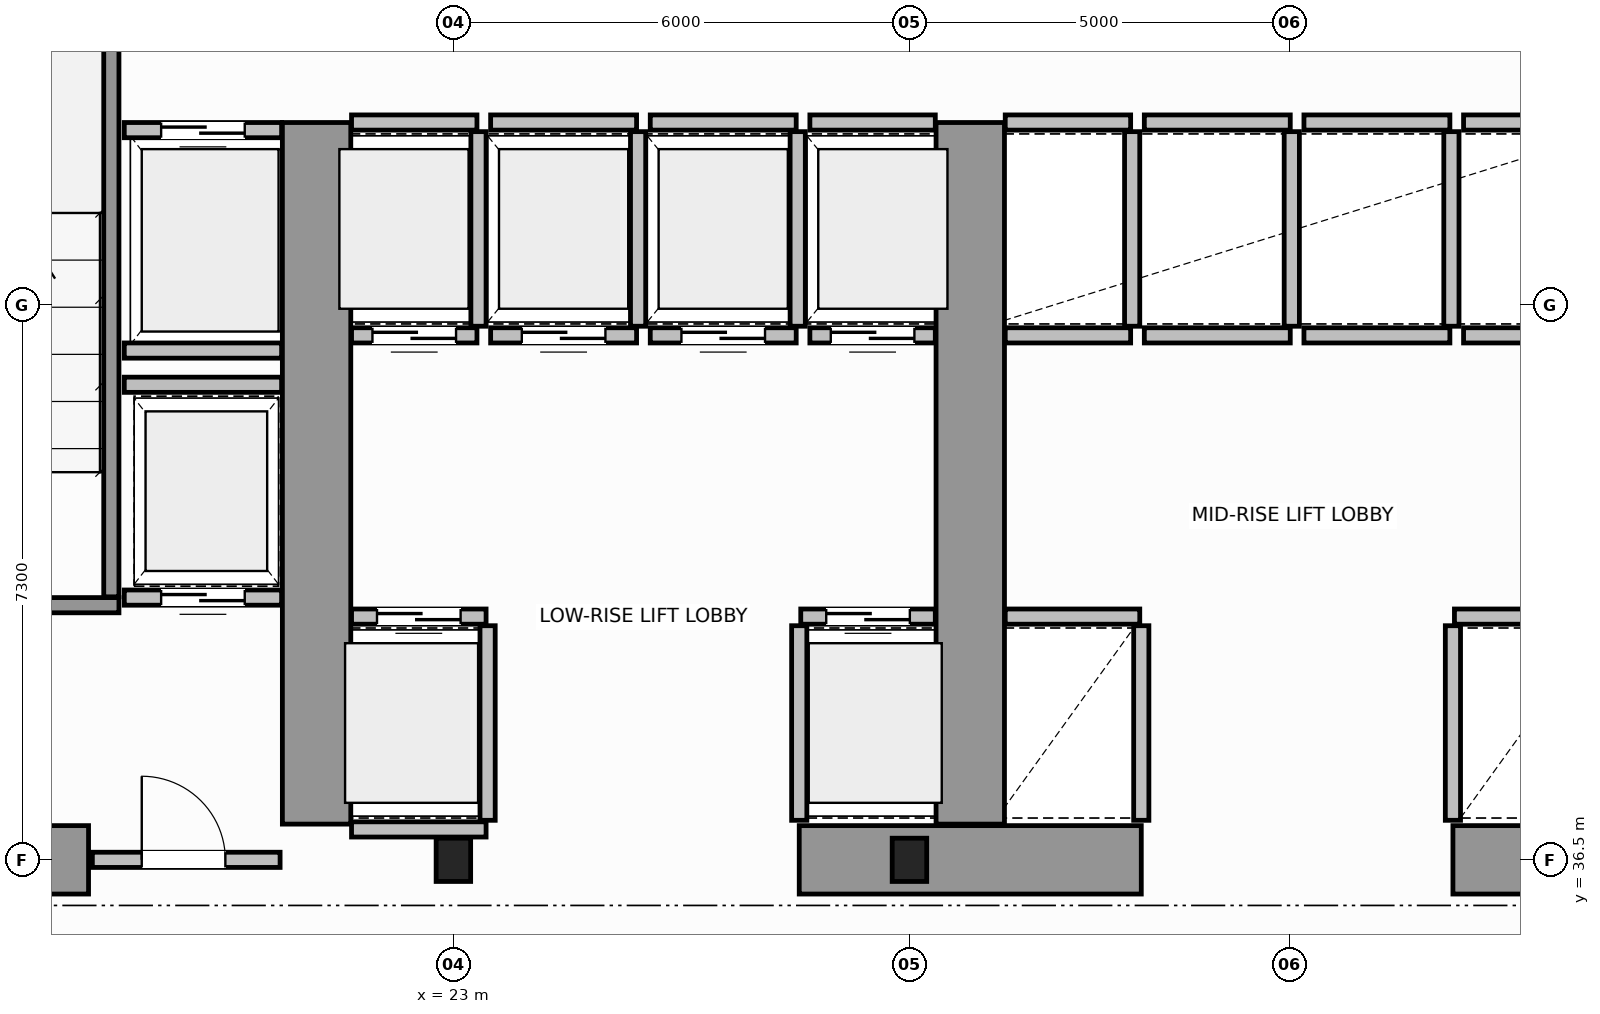
"""IFC4 building model, lengths in metres.
Left out: names, types, materials, properties, quantities, classifications, styles, units other than length and angle.
Written with IfcOpenShell. Run it as: python <this file> out.ifc"""

import sys

from ifc_helpers import new_model, si_unit, direction, frame, frame_2d, origin, origin_2d, place, context, subcontext, project, spatial, rectangle, i_section, extrude, source, transform, mapped, element, fill, save


model = new_model("IFC4")
c1 = context("Model", 3, precision=1e-05, world=origin(), true_north=direction((0.0, 1.0)))
c2 = subcontext(c1, "Body", "Model", "MODEL_VIEW")
j1 = project(units=[si_unit("LENGTHUNIT", "METRE"), si_unit("PLANEANGLEUNIT", "RADIAN")], contexts=[c1])
p1 = place(None, origin())
s1 = spatial("IfcSite", under=j1, at=p1, CompositionType="ELEMENT")
p2 = place(p1, origin())
s2 = spatial("IfcBuilding", under=s1, at=p2, CompositionType="ELEMENT")
p3 = place(p2, frame((0.0, 0.0, 68.2)))
s3 = spatial("IfcBuildingStorey", under=s2, at=p3, CompositionType="ELEMENT", Elevation=68.2)
m1 = source(origin(), c2, "Body", "SweptSolid", [
    extrude(i_section(OverallWidth=0.454, OverallDepth=0.569, WebThickness=0.078, FlangeThickness=0.08, FilletRadius=0.015, at=origin_2d()), origin(), (0.0, 0.0, 1.0), 3.8),
])
for number, where, z_axis, x_axis in (
    (1, (23.0, 36.5, 0.0), (0.0, 0.0, 1.0), (1.0, 0.0, 0.0)),
    (2, (29.0, 36.5, 0.0), (0.0, 0.0, 1.0), (1.0, 0.0, 0.0)),
):
    element("IfcColumn", number, at=place(p3, frame(where, z_axis=z_axis, x_axis=x_axis)), inside=s3, PredefinedType="COLUMN", context=c2, shape_type="MappedRepresentation", body=[
        mapped(m1, transform((0.0, 0.0, 0.0), scale=1.0)),
    ])
p4 = place(p3, frame((14.47, 36.5, 0.0), z_axis=(0.0, 0.0, 1.0), x_axis=(1.0, 0.0, 0.0)))
e3 = element("IfcWall", 3, at=p4, inside=s3, PredefinedType="SHEAR", context=c2, shape_type="SweptSolid", body=[
    extrude(rectangle(XDim=3.73, YDim=0.9, at=frame_2d((1.865, 0.0))), origin(), (0.0, 0.0, 1.0), 2.38),
])
for number, where, z_axis, x_axis in (
    (4, (27.55, 36.5, 0.0), (0.0, 0.0, 1.0), (1.0, 0.0, 0.0)),
    (5, (36.15, 36.5, 0.0), (0.0, 0.0, 1.0), (1.0, 0.0, 0.0)),
):
    element("IfcWall", number, at=place(p3, frame(where, z_axis=z_axis, x_axis=x_axis)), inside=s3, PredefinedType="SHEAR", context=c2, shape_type="SweptSolid", body=[
        extrude(rectangle(XDim=4.5, YDim=0.9, at=frame_2d((2.25, 0.0))), origin(), (0.0, 0.0, 1.0), 3.8),
    ])
for number, where, z_axis, x_axis in (
    (6, (21.2, 36.97, 0.0), (0.0, 0.0, 1.0), (0.0, 1.0, 0.0)),
    (7, (29.8, 36.97, 0.0), (0.0, 0.0, 1.0), (0.0, 1.0, 0.0)),
):
    element("IfcWall", number, at=place(p3, frame(where, z_axis=z_axis, x_axis=x_axis)), inside=s3, PredefinedType="SHEAR", context=c2, shape_type="SweptSolid", body=[
        extrude(rectangle(XDim=9.23, YDim=0.9, at=frame_2d((4.615, 0.0))), origin(), (0.0, 0.0, 1.0), 3.8),
    ])
p5 = place(p3, frame((14.45, 39.85, 0.0), z_axis=(0.0, 0.0, 1.0), x_axis=(1.0, 0.0, 0.0)))
e8 = element("IfcWall", 8, at=p5, inside=s3, PredefinedType="SOLIDWALL", context=c2, shape_type="SweptSolid", body=[
    extrude(rectangle(XDim=4.15, YDim=0.2, at=frame_2d((2.075, 0.0))), origin(), (0.0, 0.0, 1.0), 3.8),
])
p6 = place(p5, frame((1.725, 0.0, 0.0)))
e9 = element("IfcOpeningElement", 9, at=p6, cuts=e8, PredefinedType="OPENING", context=c2, shape_type="SweptSolid", body=[
    extrude(rectangle(XDim=1.1, YDim=2.15, at=frame_2d((0.55, 1.075))), frame((0.0, 0.11, 0.0), z_axis=(0.0, -1.0, 0.0), x_axis=(1.0, 0.0, 0.0)), (0.0, 0.0, 1.0), 0.22),
])
p7 = place(p3, frame((18.5, 39.96, 0.0), z_axis=(0.0, 0.0, 1.0), x_axis=(0.0, 1.0, 0.0)))
e10 = element("IfcWall", 10, at=p7, inside=s3, PredefinedType="SOLIDWALL", context=c2, shape_type="SweptSolid", body=[
    extrude(rectangle(XDim=9.93, YDim=0.2, at=frame_2d((4.965, 0.0))), origin(), (0.0, 0.0, 1.0), 3.8),
])
p8 = place(p3, frame((18.25, 36.5, 0.0), z_axis=(0.0, 0.0, 1.0), x_axis=(1.0, 0.0, 0.0)))
e11 = element("IfcWall", 11, at=p8, inside=s3, PredefinedType="SOLIDWALL", context=c2, shape_type="SweptSolid", body=[
    extrude(rectangle(XDim=2.47, YDim=0.2, at=frame_2d((1.235, 0.0))), origin(), (0.0, 0.0, 1.0), 2.37),
])
p9 = place(p8, frame((0.65, 0.0, 0.0)))
e12 = element("IfcOpeningElement", 12, at=p9, cuts=e11, PredefinedType="OPENING", context=c2, shape_type="SweptSolid", body=[
    extrude(rectangle(XDim=1.1, YDim=2.15, at=frame_2d((0.55, 1.075))), frame((0.0, 0.11, 0.0), z_axis=(0.0, -1.0, 0.0), x_axis=(1.0, 0.0, 0.0)), (0.0, 0.0, 1.0), 0.22),
])
p10 = place(p3, frame((21.66, 39.7, 0.0), z_axis=(0.0, 0.0, 1.0), x_axis=(1.0, 0.0, 0.0)))
e13 = element("IfcWall", 13, at=p10, inside=s3, PredefinedType="SOLIDWALL", context=c2, shape_type="SweptSolid", body=[
    extrude(rectangle(XDim=1.77, YDim=0.2, at=frame_2d((0.885, 0.0))), origin(), (0.0, 0.0, 1.0), 3.58),
])
p11 = place(p10, frame((0.335, 0.0, 0.0)))
e14 = element("IfcOpeningElement", 14, at=p11, cuts=e13, PredefinedType="OPENING", context=c2, shape_type="SweptSolid", body=[
    extrude(rectangle(XDim=1.1, YDim=2.15, at=frame_2d((0.55, 1.075))), frame((0.0, 0.11, 0.0), z_axis=(0.0, -1.0, 0.0), x_axis=(1.0, 0.0, 0.0)), (0.0, 0.0, 1.0), 0.22),
])
p12 = place(p3, frame((21.66, 36.9, 0.0), z_axis=(0.0, 0.0, 1.0), x_axis=(1.0, 0.0, 0.0)))
e15 = element("IfcWall", 15, at=p12, inside=s3, PredefinedType="SOLIDWALL", context=c2, shape_type="SweptSolid", body=[
    extrude(rectangle(XDim=1.77, YDim=0.2, at=frame_2d((0.885, 0.0))), origin(), (0.0, 0.0, 1.0), 2.37),
])
p13 = place(p3, frame((23.45, 37.02, 0.0), z_axis=(0.0, 0.0, 1.0), x_axis=(0.0, 1.0, 0.0)))
e16 = element("IfcWall", 16, at=p13, inside=s3, PredefinedType="SOLIDWALL", context=c2, shape_type="SweptSolid", body=[
    extrude(rectangle(XDim=2.56, YDim=0.2, at=frame_2d((1.28, 0.0))), origin(), (0.0, 0.0, 1.0), 3.58),
])
p14 = place(p3, frame((27.57, 39.7, 0.0), z_axis=(0.0, 0.0, 1.0), x_axis=(1.0, 0.0, 0.0)))
e17 = element("IfcWall", 17, at=p14, inside=s3, PredefinedType="SOLIDWALL", context=c2, shape_type="SweptSolid", body=[
    extrude(rectangle(XDim=1.77, YDim=0.2, at=frame_2d((0.885, 0.0))), origin(), (0.0, 0.0, 1.0), 3.58),
])
p15 = place(p14, frame((0.335, 0.0, 0.0)))
e18 = element("IfcOpeningElement", 18, at=p15, cuts=e17, PredefinedType="OPENING", context=c2, shape_type="SweptSolid", body=[
    extrude(rectangle(XDim=1.1, YDim=2.15, at=frame_2d((0.55, 1.075))), frame((0.0, 0.11, 0.0), z_axis=(0.0, -1.0, 0.0), x_axis=(1.0, 0.0, 0.0)), (0.0, 0.0, 1.0), 0.22),
])
p16 = place(p3, frame((27.55, 37.02, 0.0), z_axis=(0.0, 0.0, 1.0), x_axis=(0.0, 1.0, 0.0)))
e19 = element("IfcWall", 19, at=p16, inside=s3, PredefinedType="SOLIDWALL", context=c2, shape_type="SweptSolid", body=[
    extrude(rectangle(XDim=2.56, YDim=0.2, at=frame_2d((1.28, 0.0))), origin(), (0.0, 0.0, 1.0), 3.58),
])
p17 = place(p3, frame((21.66, 43.4, 0.0), z_axis=(0.0, 0.0, 1.0), x_axis=(1.0, 0.0, 0.0)))
e20 = element("IfcWall", 20, at=p17, inside=s3, PredefinedType="SOLIDWALL", context=c2, shape_type="SweptSolid", body=[
    extrude(rectangle(XDim=1.65, YDim=0.2, at=frame_2d((0.825, 0.0))), origin(), (0.0, 0.0, 1.0), 3.58),
])
p18 = place(p17, frame((0.275, 0.0, 0.0)))
e21 = element("IfcOpeningElement", 21, at=p18, cuts=e20, PredefinedType="OPENING", context=c2, shape_type="SweptSolid", body=[
    extrude(rectangle(XDim=1.1, YDim=2.15, at=frame_2d((0.55, 1.075))), frame((0.0, 0.11, 0.0), z_axis=(0.0, -1.0, 0.0), x_axis=(1.0, 0.0, 0.0)), (0.0, 0.0, 1.0), 0.22),
])
p19 = place(p3, frame((21.66, 46.2, 0.0), z_axis=(0.0, 0.0, 1.0), x_axis=(1.0, 0.0, 0.0)))
e22 = element("IfcWall", 22, at=p19, inside=s3, PredefinedType="SOLIDWALL", context=c2, shape_type="SweptSolid", body=[
    extrude(rectangle(XDim=1.65, YDim=0.2, at=frame_2d((0.825, 0.0))), origin(), (0.0, 0.0, 1.0), 3.58),
])
p20 = place(p3, frame((23.33, 43.52, 0.0), z_axis=(0.0, 0.0, 1.0), x_axis=(0.0, 1.0, 0.0)))
e23 = element("IfcWall", 23, at=p20, inside=s3, PredefinedType="SOLIDWALL", context=c2, shape_type="SweptSolid", body=[
    extrude(rectangle(XDim=2.56, YDim=0.2, at=frame_2d((1.28, 0.0))), origin(), (0.0, 0.0, 1.0), 3.58),
])
p21 = place(p3, frame((23.49, 43.4, 0.0), z_axis=(0.0, 0.0, 1.0), x_axis=(1.0, 0.0, 0.0)))
e24 = element("IfcWall", 24, at=p21, inside=s3, PredefinedType="SOLIDWALL", context=c2, shape_type="SweptSolid", body=[
    extrude(rectangle(XDim=1.92, YDim=0.2, at=frame_2d((0.96, 0.0))), origin(), (0.0, 0.0, 1.0), 3.58),
])
p22 = place(p21, frame((0.41, 0.0, 0.0)))
e25 = element("IfcOpeningElement", 25, at=p22, cuts=e24, PredefinedType="OPENING", context=c2, shape_type="SweptSolid", body=[
    extrude(rectangle(XDim=1.1, YDim=2.15, at=frame_2d((0.55, 1.075))), frame((0.0, 0.11, 0.0), z_axis=(0.0, -1.0, 0.0), x_axis=(1.0, 0.0, 0.0)), (0.0, 0.0, 1.0), 0.22),
])
p23 = place(p3, frame((23.49, 46.2, 0.0), z_axis=(0.0, 0.0, 1.0), x_axis=(1.0, 0.0, 0.0)))
e26 = element("IfcWall", 26, at=p23, inside=s3, PredefinedType="SOLIDWALL", context=c2, shape_type="SweptSolid", body=[
    extrude(rectangle(XDim=1.92, YDim=0.2, at=frame_2d((0.96, 0.0))), origin(), (0.0, 0.0, 1.0), 3.58),
])
p24 = place(p3, frame((25.43, 43.52, 0.0), z_axis=(0.0, 0.0, 1.0), x_axis=(0.0, 1.0, 0.0)))
e27 = element("IfcWall", 27, at=p24, inside=s3, PredefinedType="SOLIDWALL", context=c2, shape_type="SweptSolid", body=[
    extrude(rectangle(XDim=2.56, YDim=0.2, at=frame_2d((1.28, 0.0))), origin(), (0.0, 0.0, 1.0), 3.58),
])
p25 = place(p3, frame((25.59, 43.4, 0.0), z_axis=(0.0, 0.0, 1.0), x_axis=(1.0, 0.0, 0.0)))
e28 = element("IfcWall", 28, at=p25, inside=s3, PredefinedType="SOLIDWALL", context=c2, shape_type="SweptSolid", body=[
    extrude(rectangle(XDim=1.92, YDim=0.2, at=frame_2d((0.96, 0.0))), origin(), (0.0, 0.0, 1.0), 3.58),
])
p26 = place(p25, frame((0.41, 0.0, 0.0)))
e29 = element("IfcOpeningElement", 29, at=p26, cuts=e28, PredefinedType="OPENING", context=c2, shape_type="SweptSolid", body=[
    extrude(rectangle(XDim=1.1, YDim=2.15, at=frame_2d((0.55, 1.075))), frame((0.0, 0.11, 0.0), z_axis=(0.0, -1.0, 0.0), x_axis=(1.0, 0.0, 0.0)), (0.0, 0.0, 1.0), 0.22),
])
p27 = place(p3, frame((25.59, 46.2, 0.0), z_axis=(0.0, 0.0, 1.0), x_axis=(1.0, 0.0, 0.0)))
e30 = element("IfcWall", 30, at=p27, inside=s3, PredefinedType="SOLIDWALL", context=c2, shape_type="SweptSolid", body=[
    extrude(rectangle(XDim=1.92, YDim=0.2, at=frame_2d((0.96, 0.0))), origin(), (0.0, 0.0, 1.0), 3.58),
])
p28 = place(p3, frame((27.53, 43.52, 0.0), z_axis=(0.0, 0.0, 1.0), x_axis=(0.0, 1.0, 0.0)))
e31 = element("IfcWall", 31, at=p28, inside=s3, PredefinedType="SOLIDWALL", context=c2, shape_type="SweptSolid", body=[
    extrude(rectangle(XDim=2.56, YDim=0.2, at=frame_2d((1.28, 0.0))), origin(), (0.0, 0.0, 1.0), 3.58),
])
p29 = place(p3, frame((27.69, 43.4, 0.0), z_axis=(0.0, 0.0, 1.0), x_axis=(1.0, 0.0, 0.0)))
e32 = element("IfcWall", 32, at=p29, inside=s3, PredefinedType="SOLIDWALL", context=c2, shape_type="SweptSolid", body=[
    extrude(rectangle(XDim=1.65, YDim=0.2, at=frame_2d((0.825, 0.0))), origin(), (0.0, 0.0, 1.0), 3.58),
])
p30 = place(p29, frame((0.275, 0.0, 0.0)))
e33 = element("IfcOpeningElement", 33, at=p30, cuts=e32, PredefinedType="OPENING", context=c2, shape_type="SweptSolid", body=[
    extrude(rectangle(XDim=1.1, YDim=2.15, at=frame_2d((0.55, 1.075))), frame((0.0, 0.11, 0.0), z_axis=(0.0, -1.0, 0.0), x_axis=(1.0, 0.0, 0.0)), (0.0, 0.0, 1.0), 0.22),
])
p31 = place(p3, frame((27.69, 46.2, 0.0), z_axis=(0.0, 0.0, 1.0), x_axis=(1.0, 0.0, 0.0)))
e34 = element("IfcWall", 34, at=p31, inside=s3, PredefinedType="SOLIDWALL", context=c2, shape_type="SweptSolid", body=[
    extrude(rectangle(XDim=1.65, YDim=0.2, at=frame_2d((0.825, 0.0))), origin(), (0.0, 0.0, 1.0), 3.58),
])
p32 = place(p3, frame((30.26, 39.7, 0.0), z_axis=(0.0, 0.0, 1.0), x_axis=(1.0, 0.0, 0.0)))
e35 = element("IfcWall", 35, at=p32, inside=s3, PredefinedType="SOLIDWALL", context=c2, shape_type="SweptSolid", body=[
    extrude(rectangle(XDim=1.77, YDim=0.2, at=frame_2d((0.885, 0.0))), origin(), (0.0, 0.0, 1.0), 3.58),
])
p33 = place(p3, frame((32.05, 37.02, 0.0), z_axis=(0.0, 0.0, 1.0), x_axis=(0.0, 1.0, 0.0)))
e36 = element("IfcWall", 36, at=p33, inside=s3, PredefinedType="SOLIDWALL", context=c2, shape_type="SweptSolid", body=[
    extrude(rectangle(XDim=2.56, YDim=0.2, at=frame_2d((1.28, 0.0))), origin(), (0.0, 0.0, 1.0), 3.58),
])
p34 = place(p3, frame((36.17, 39.7, 0.0), z_axis=(0.0, 0.0, 1.0), x_axis=(1.0, 0.0, 0.0)))
e37 = element("IfcWall", 37, at=p34, inside=s3, PredefinedType="SOLIDWALL", context=c2, shape_type="SweptSolid", body=[
    extrude(rectangle(XDim=1.77, YDim=0.2, at=frame_2d((0.885, 0.0))), origin(), (0.0, 0.0, 1.0), 3.58),
])
p35 = place(p3, frame((36.15, 37.02, 0.0), z_axis=(0.0, 0.0, 1.0), x_axis=(0.0, 1.0, 0.0)))
e38 = element("IfcWall", 38, at=p35, inside=s3, PredefinedType="SOLIDWALL", context=c2, shape_type="SweptSolid", body=[
    extrude(rectangle(XDim=2.56, YDim=0.2, at=frame_2d((1.28, 0.0))), origin(), (0.0, 0.0, 1.0), 3.58),
])
for number, where, z_axis, x_axis in (
    (39, (30.26, 43.4, 0.0), (0.0, 0.0, 1.0), (1.0, 0.0, 0.0)),
    (40, (30.26, 46.2, 0.0), (0.0, 0.0, 1.0), (1.0, 0.0, 0.0)),
):
    element("IfcWall", number, at=place(p3, frame(where, z_axis=z_axis, x_axis=x_axis)), inside=s3, PredefinedType="SOLIDWALL", context=c2, shape_type="SweptSolid", body=[
        extrude(rectangle(XDim=1.65, YDim=0.2, at=frame_2d((0.825, 0.0))), origin(), (0.0, 0.0, 1.0), 3.58),
    ])
p36 = place(p3, frame((31.93, 43.52, 0.0), z_axis=(0.0, 0.0, 1.0), x_axis=(0.0, 1.0, 0.0)))
e41 = element("IfcWall", 41, at=p36, inside=s3, PredefinedType="SOLIDWALL", context=c2, shape_type="SweptSolid", body=[
    extrude(rectangle(XDim=2.56, YDim=0.2, at=frame_2d((1.28, 0.0))), origin(), (0.0, 0.0, 1.0), 3.58),
])
for number, where, z_axis, x_axis in (
    (42, (32.09, 43.4, 0.0), (0.0, 0.0, 1.0), (1.0, 0.0, 0.0)),
    (43, (32.09, 46.2, 0.0), (0.0, 0.0, 1.0), (1.0, 0.0, 0.0)),
):
    element("IfcWall", number, at=place(p3, frame(where, z_axis=z_axis, x_axis=x_axis)), inside=s3, PredefinedType="SOLIDWALL", context=c2, shape_type="SweptSolid", body=[
        extrude(rectangle(XDim=1.92, YDim=0.2, at=frame_2d((0.96, 0.0))), origin(), (0.0, 0.0, 1.0), 3.58),
    ])
p37 = place(p3, frame((34.03, 43.52, 0.0), z_axis=(0.0, 0.0, 1.0), x_axis=(0.0, 1.0, 0.0)))
e44 = element("IfcWall", 44, at=p37, inside=s3, PredefinedType="SOLIDWALL", context=c2, shape_type="SweptSolid", body=[
    extrude(rectangle(XDim=2.56, YDim=0.2, at=frame_2d((1.28, 0.0))), origin(), (0.0, 0.0, 1.0), 3.58),
])
for number, where, z_axis, x_axis in (
    (45, (34.19, 43.4, 0.0), (0.0, 0.0, 1.0), (1.0, 0.0, 0.0)),
    (46, (34.19, 46.2, 0.0), (0.0, 0.0, 1.0), (1.0, 0.0, 0.0)),
):
    element("IfcWall", number, at=place(p3, frame(where, z_axis=z_axis, x_axis=x_axis)), inside=s3, PredefinedType="SOLIDWALL", context=c2, shape_type="SweptSolid", body=[
        extrude(rectangle(XDim=1.92, YDim=0.2, at=frame_2d((0.96, 0.0))), origin(), (0.0, 0.0, 1.0), 3.58),
    ])
p38 = place(p3, frame((36.13, 43.52, 0.0), z_axis=(0.0, 0.0, 1.0), x_axis=(0.0, 1.0, 0.0)))
e47 = element("IfcWall", 47, at=p38, inside=s3, PredefinedType="SOLIDWALL", context=c2, shape_type="SweptSolid", body=[
    extrude(rectangle(XDim=2.56, YDim=0.2, at=frame_2d((1.28, 0.0))), origin(), (0.0, 0.0, 1.0), 3.58),
])
for number, where, z_axis, x_axis in (
    (48, (36.29, 43.4, 0.0), (0.0, 0.0, 1.0), (1.0, 0.0, 0.0)),
    (49, (36.29, 46.2, 0.0), (0.0, 0.0, 1.0), (1.0, 0.0, 0.0)),
):
    element("IfcWall", number, at=place(p3, frame(where, z_axis=z_axis, x_axis=x_axis)), inside=s3, PredefinedType="SOLIDWALL", context=c2, shape_type="SweptSolid", body=[
        extrude(rectangle(XDim=1.65, YDim=0.2, at=frame_2d((0.825, 0.0))), origin(), (0.0, 0.0, 1.0), 3.58),
    ])
p39 = place(p3, frame((18.67, 46.1, 0.0), z_axis=(0.0, 0.0, 1.0), x_axis=(1.0, 0.0, 0.0)))
e50 = element("IfcWall", 50, at=p39, inside=s3, PredefinedType="SOLIDWALL", context=c2, shape_type="SweptSolid", body=[
    extrude(rectangle(XDim=2.07, YDim=0.2, at=frame_2d((1.035, 0.0))), origin(), (0.0, 0.0, 1.0), 3.58),
])
p40 = place(p39, frame((0.485, 0.0, 0.0)))
e51 = element("IfcOpeningElement", 51, at=p40, cuts=e50, PredefinedType="OPENING", context=c2, shape_type="SweptSolid", body=[
    extrude(rectangle(XDim=1.1, YDim=2.15, at=frame_2d((0.55, 1.075))), frame((0.0, 0.11, 0.0), z_axis=(0.0, -1.0, 0.0), x_axis=(1.0, 0.0, 0.0)), (0.0, 0.0, 1.0), 0.22),
])
p41 = place(p3, frame((18.67, 43.2, 0.0), z_axis=(0.0, 0.0, 1.0), x_axis=(1.0, 0.0, 0.0)))
e52 = element("IfcWall", 52, at=p41, inside=s3, PredefinedType="SOLIDWALL", context=c2, shape_type="SweptSolid", body=[
    extrude(rectangle(XDim=2.07, YDim=0.2, at=frame_2d((1.035, 0.0))), origin(), (0.0, 0.0, 1.0), 3.58),
])
p42 = place(p3, frame((18.67, 39.95, 0.0), z_axis=(0.0, 0.0, 1.0), x_axis=(1.0, 0.0, 0.0)))
e53 = element("IfcWall", 53, at=p42, inside=s3, PredefinedType="SOLIDWALL", context=c2, shape_type="SweptSolid", body=[
    extrude(rectangle(XDim=2.07, YDim=0.2, at=frame_2d((1.035, 0.0))), origin(), (0.0, 0.0, 1.0), 3.58),
])
p43 = place(p42, frame((0.485, 0.0, 0.0)))
e54 = element("IfcOpeningElement", 54, at=p43, cuts=e53, PredefinedType="OPENING", context=c2, shape_type="SweptSolid", body=[
    extrude(rectangle(XDim=1.1, YDim=2.15, at=frame_2d((0.55, 1.075))), frame((0.0, 0.11, 0.0), z_axis=(0.0, -1.0, 0.0), x_axis=(1.0, 0.0, 0.0)), (0.0, 0.0, 1.0), 0.22),
])
p44 = place(p3, frame((18.67, 42.75, 0.0), z_axis=(0.0, 0.0, 1.0), x_axis=(1.0, 0.0, 0.0)))
e55 = element("IfcWall", 55, at=p44, inside=s3, PredefinedType="SOLIDWALL", context=c2, shape_type="SweptSolid", body=[
    extrude(rectangle(XDim=2.07, YDim=0.2, at=frame_2d((1.035, 0.0))), origin(), (0.0, 0.0, 1.0), 3.58),
])
m2 = source(origin(), c2, "Body", "SweptSolid", [
    extrude(rectangle(XDim=1.1, YDim=2.15, at=frame_2d((0.55, 1.075))), frame((0.0, 0.025, 0.0), z_axis=(0.0, -1.0, 0.0), x_axis=(1.0, 0.0, 0.0)), (0.0, 0.0, 1.0), 0.05),
])
p45 = place(p9, origin())
e56 = element("IfcDoor", 56, at=p45, inside=s3, OperationType="SINGLE_SWING_RIGHT", PredefinedType="DOOR", context=c2, shape_type="MappedRepresentation", body=[
    mapped(m2, transform((0.0, 0.0, 0.0), scale=1.0)),
])
fill(e12, e56)
p46 = place(p11, origin())
e57 = element("IfcDoor", 57, at=p46, inside=s3, OperationType="DOUBLE_DOOR_SLIDING", PredefinedType="DOOR", context=c2, shape_type="MappedRepresentation", body=[
    mapped(m2, transform((0.0, 0.0, 0.0), scale=1.0)),
])
fill(e14, e57)
p47 = place(p15, origin())
e58 = element("IfcDoor", 58, at=p47, inside=s3, OperationType="DOUBLE_DOOR_SLIDING", PredefinedType="DOOR", context=c2, shape_type="MappedRepresentation", body=[
    mapped(m2, transform((0.0, 0.0, 0.0), scale=1.0)),
])
fill(e18, e58)
p48 = place(p18, origin())
e59 = element("IfcDoor", 59, at=p48, inside=s3, OperationType="DOUBLE_DOOR_SLIDING", PredefinedType="DOOR", context=c2, shape_type="MappedRepresentation", body=[
    mapped(m2, transform((0.0, 0.0, 0.0), scale=1.0)),
])
fill(e21, e59)
p49 = place(p22, origin())
e60 = element("IfcDoor", 60, at=p49, inside=s3, OperationType="DOUBLE_DOOR_SLIDING", PredefinedType="DOOR", context=c2, shape_type="MappedRepresentation", body=[
    mapped(m2, transform((0.0, 0.0, 0.0), scale=1.0)),
])
fill(e25, e60)
p50 = place(p26, origin())
e61 = element("IfcDoor", 61, at=p50, inside=s3, OperationType="DOUBLE_DOOR_SLIDING", PredefinedType="DOOR", context=c2, shape_type="MappedRepresentation", body=[
    mapped(m2, transform((0.0, 0.0, 0.0), scale=1.0)),
])
fill(e29, e61)
p51 = place(p30, origin())
e62 = element("IfcDoor", 62, at=p51, inside=s3, OperationType="DOUBLE_DOOR_SLIDING", PredefinedType="DOOR", context=c2, shape_type="MappedRepresentation", body=[
    mapped(m2, transform((0.0, 0.0, 0.0), scale=1.0)),
])
fill(e33, e62)
p52 = place(p40, origin())
e63 = element("IfcDoor", 63, at=p52, inside=s3, OperationType="DOUBLE_DOOR_SLIDING", PredefinedType="DOOR", context=c2, shape_type="MappedRepresentation", body=[
    mapped(m2, transform((0.0, 0.0, 0.0), scale=1.0)),
])
fill(e51, e63)
p53 = place(p43, origin())
e64 = element("IfcDoor", 64, at=p53, inside=s3, OperationType="DOUBLE_DOOR_SLIDING", PredefinedType="DOOR", context=c2, shape_type="MappedRepresentation", body=[
    mapped(m2, transform((0.0, 0.0, 0.0), scale=1.0)),
])
fill(e54, e64)
save(model, sys.argv[1])
